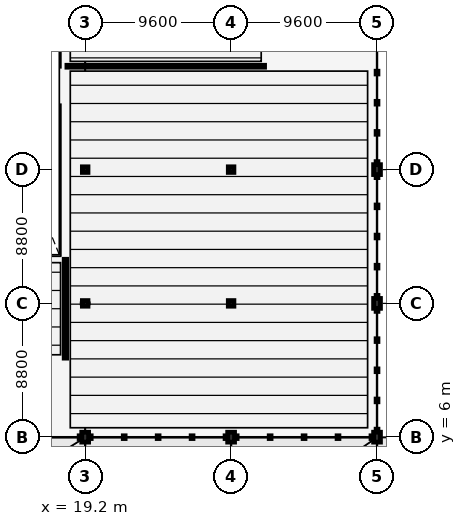
"""IFC4 building model, lengths in metres.
Left out: names, types, materials, properties, quantities, classifications, styles, units other than length and angle.
Written with IfcOpenShell. Run it as: python <this file> out.ifc"""

import sys

from ifc_helpers import new_model, si_unit, direction, frame, frame_2d, origin, origin_2d, place, context, subcontext, project, spatial, rectangle, i_section, extrude, element, fill, save


model = new_model("IFC4")
c1 = context("Model", 3, precision=1e-05, world=origin(), true_north=direction((0.0, 1.0)))
c2 = subcontext(c1, "Body", "Model", "MODEL_VIEW")
j1 = project(units=[si_unit("LENGTHUNIT", "METRE"), si_unit("PLANEANGLEUNIT", "RADIAN")], contexts=[c1])
p1 = place(None, origin())
s1 = spatial("IfcSite", under=j1, at=p1, CompositionType="ELEMENT")
p2 = place(p1, origin())
s2 = spatial("IfcBuilding", under=s1, at=p2, CompositionType="ELEMENT")
p3 = place(p2, frame((0.0, 0.0, 4.8)))
s3 = spatial("IfcBuildingStorey", under=s2, at=p3, CompositionType="ELEMENT", Elevation=4.8)
p4 = place(p3, frame((19.2, 6.0, 0.0), z_axis=(0.0, 0.0, 1.0), x_axis=(1.0, 0.0, 0.0)))
e1 = element("IfcColumn", 1, at=p4, inside=s3, PredefinedType="COLUMN", context=c2, shape_type="SweptSolid", body=[
    extrude(rectangle(XDim=0.45, YDim=0.65, at=origin_2d()), origin(), (0.0, 0.0, 1.0), 4.8),
])
for number, where, z_axis, x_axis in (
    (2, (19.2, 14.8, 0.0), (0.0, 0.0, 1.0), (1.0, 0.0, 0.0)),
    (3, (19.2, 23.6, 0.0), (0.0, 0.0, 1.0), (1.0, 0.0, 0.0)),
):
    element("IfcColumn", number, at=place(p3, frame(where, z_axis=z_axis, x_axis=x_axis)), inside=s3, PredefinedType="COLUMN", context=c2, shape_type="SweptSolid", body=[
        extrude(i_section(OverallWidth=0.368, OverallDepth=0.368, WebThickness=0.015, FlangeThickness=0.024, FilletRadius=0.025, at=origin_2d()), origin(), (0.0, 0.0, 1.0), 4.8),
    ])
p5 = place(p3, frame((28.8, 6.0, 0.0), z_axis=(0.0, 0.0, 1.0), x_axis=(1.0, 0.0, 0.0)))
e4 = element("IfcColumn", 4, at=p5, inside=s3, PredefinedType="COLUMN", context=c2, shape_type="SweptSolid", body=[
    extrude(rectangle(XDim=0.45, YDim=0.65, at=origin_2d()), origin(), (0.0, 0.0, 1.0), 4.8),
])
for number, where, z_axis, x_axis in (
    (5, (28.8, 14.8, 0.0), (0.0, 0.0, 1.0), (1.0, 0.0, 0.0)),
    (6, (28.8, 23.6, 0.0), (0.0, 0.0, 1.0), (1.0, 0.0, 0.0)),
):
    element("IfcColumn", number, at=place(p3, frame(where, z_axis=z_axis, x_axis=x_axis)), inside=s3, PredefinedType="COLUMN", context=c2, shape_type="SweptSolid", body=[
        extrude(i_section(OverallWidth=0.368, OverallDepth=0.368, WebThickness=0.015, FlangeThickness=0.024, FilletRadius=0.025, at=origin_2d()), origin(), (0.0, 0.0, 1.0), 4.8),
    ])
for number, where, z_axis, x_axis in (
    (7, (38.4, 6.0, 0.0), (0.0, 0.0, 1.0), (1.0, 0.0, 0.0)),
    (8, (38.4, 14.8, 0.0), (0.0, 0.0, 1.0), (1.0, 0.0, 0.0)),
    (9, (38.4, 23.6, 0.0), (0.0, 0.0, 1.0), (1.0, 0.0, 0.0)),
):
    element("IfcColumn", number, at=place(p3, frame(where, z_axis=z_axis, x_axis=x_axis)), inside=s3, PredefinedType="COLUMN", context=c2, shape_type="SweptSolid", body=[
        extrude(rectangle(XDim=0.45, YDim=0.65, at=origin_2d()), origin(), (0.0, 0.0, 1.0), 4.8),
    ])
p6 = place(p3, frame((17.9, 11.2, 0.0), z_axis=(0.0, 0.0, 1.0), x_axis=(0.0, 1.0, 0.0)))
e10 = element("IfcWall", 10, at=p6, inside=s3, PredefinedType="PARTITIONING", context=c2, shape_type="SweptSolid", body=[
    extrude(rectangle(XDim=6.5, YDim=0.16, at=frame_2d((3.25, 0.0))), origin(), (0.0, 0.0, 1.0), 4.42),
])
p7 = place(p6, frame((0.559, 0.0, 0.0)))
e11 = element("IfcOpeningElement", 11, at=p7, cuts=e10, PredefinedType="OPENING", context=c2, shape_type="SweptSolid", body=[
    extrude(rectangle(XDim=1.8, YDim=2.15, at=frame_2d((0.9, 1.075))), frame((0.0, 0.09, 0.0), z_axis=(0.0, -1.0, 0.0), x_axis=(1.0, 0.0, 0.0)), (0.0, 0.0, 1.0), 0.18),
])
p8 = place(p3, frame((18.0, 30.4, 0.0), z_axis=(0.0, 0.0, 1.0), x_axis=(1.0, 0.0, 0.0)))
e12 = element("IfcWall", 12, at=p8, inside=s3, PredefinedType="PARTITIONING", context=c2, shape_type="SweptSolid", body=[
    extrude(rectangle(XDim=13.0, YDim=0.125, at=frame_2d((6.5, 0.0))), origin(), (0.0, 0.0, 1.0), 4.42),
])
p9 = place(p7, origin())
e13 = element("IfcDoor", 13, at=p9, inside=s3, OperationType="DOUBLE_DOOR_SINGLE_SWING", PredefinedType="DOOR", context=c2, shape_type="SweptSolid", body=[
    extrude(rectangle(XDim=1.8, YDim=2.15, at=frame_2d((0.9, 1.075))), frame((0.0, 0.025, 0.0), z_axis=(0.0, -1.0, 0.0), x_axis=(1.0, 0.0, 0.0)), (0.0, 0.0, 1.0), 0.05),
])
fill(e11, e13)
save(model, sys.argv[1])
